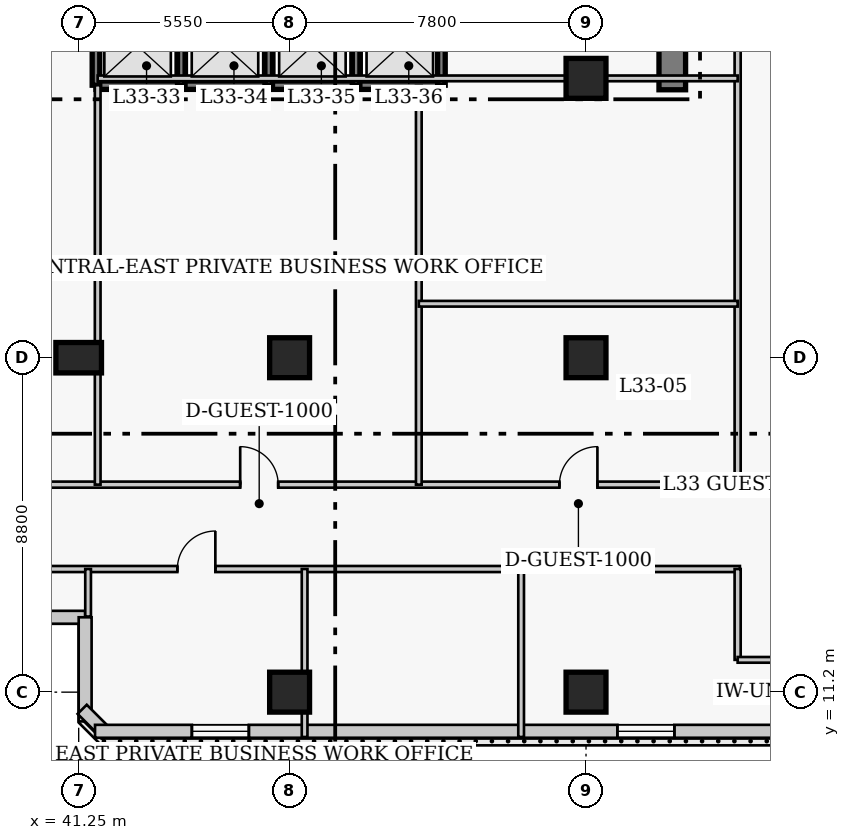
"""IFC4 building model, lengths in metres.
Left out: names, types, materials, properties, quantities, classifications, styles, units other than length and angle.
Written with IfcOpenShell. Run it as: python <this file> out.ifc"""

import sys

from ifc_helpers import new_model, si_unit, direction, frame, frame_2d, origin, origin_2d, place, context, subcontext, project, spatial, rectangle, extrude, element, fill, save


model = new_model("IFC4")
c1 = context("Model", 3, precision=1e-05, world=origin(), true_north=direction((0.0, 1.0)))
c2 = subcontext(c1, "Body", "Model", "MODEL_VIEW")
j1 = project(units=[si_unit("LENGTHUNIT", "METRE"), si_unit("PLANEANGLEUNIT", "RADIAN")], contexts=[c1])
p1 = place(None, origin())
s1 = spatial("IfcSite", under=j1, at=p1, CompositionType="ELEMENT")
p2 = place(p1, origin())
s2 = spatial("IfcBuilding", under=s1, at=p2, CompositionType="ELEMENT")
p3 = place(p2, frame((0.0, 0.0, 134.6)))
s3 = spatial("IfcBuildingStorey", under=s2, at=p3, CompositionType="ELEMENT", Elevation=134.6)
p4 = place(p3, frame((56.87, 27.05, 0.0), z_axis=(0.0, 0.0, 1.0), x_axis=(0.0, 1.0, 0.0)))
e1 = element("IfcWall", 1, at=p4, inside=s3, PredefinedType="SHEAR", context=c2, shape_type="SweptSolid", body=[
    extrude(rectangle(XDim=13.62, YDim=0.7, at=frame_2d((6.81, 0.0))), origin(), (0.0, 0.0, 1.0), 3.8),
])
p5 = place(p3, frame((41.25, 20.0, 0.0), z_axis=(0.0, 0.0, 1.0), x_axis=(1.0, 0.0, 0.0)))
e2 = element("IfcColumn", 2, at=p5, inside=s3, PredefinedType="COLUMN", context=c2, shape_type="SweptSolid", body=[
    extrude(rectangle(XDim=1.2, YDim=0.8, at=origin_2d()), origin(), (0.0, 0.0, 1.0), 3.8),
])
for number, where, z_axis, x_axis in (
    (3, (46.8, 11.2, 0.0), (0.0, 0.0, 1.0), (1.0, 0.0, 0.0)),
    (4, (46.8, 20.0, 0.0), (0.0, 0.0, 1.0), (1.0, 0.0, 0.0)),
    (5, (54.6, 11.2, 0.0), (0.0, 0.0, 1.0), (1.0, 0.0, 0.0)),
    (6, (54.6, 20.0, 0.0), (0.0, 0.0, 1.0), (1.0, 0.0, 0.0)),
    (7, (54.6, 27.35, 0.0), (0.0, 0.0, 1.0), (1.0, 0.0, 0.0)),
):
    element("IfcColumn", number, at=place(p3, frame(where, z_axis=z_axis, x_axis=x_axis)), inside=s3, PredefinedType="COLUMN", context=c2, shape_type="SweptSolid", body=[
        extrude(rectangle(XDim=1.05, YDim=1.05, at=origin_2d()), origin(), (0.0, 0.0, 1.0), 3.8),
    ])
p6 = place(p3, frame((36.58, 13.17, 0.0), z_axis=(0.0, 0.0, 1.0), x_axis=(1.0, 0.0, 0.0)))
e8 = element("IfcWall", 8, at=p6, inside=s3, PredefinedType="SOLIDWALL", context=c2, shape_type="SweptSolid", body=[
    extrude(rectangle(XDim=4.84, YDim=0.34, at=frame_2d((2.42, 0.0))), origin(), (0.0, 0.0, 1.0), 3.55),
])
p7 = place(p6, frame((1.67, 0.0, 0.85)))
e9 = element("IfcOpeningElement", 9, at=p7, cuts=e8, PredefinedType="OPENING", context=c2, shape_type="SweptSolid", body=[
    extrude(rectangle(XDim=1.5, YDim=1.75, at=frame_2d((0.75, 0.875))), frame((0.0, 0.18, 0.0), z_axis=(0.0, -1.0, 0.0), x_axis=(1.0, 0.0, 0.0)), (0.0, 0.0, 1.0), 0.36),
])
p8 = place(p3, frame((41.42, 13.17, 0.0), z_axis=(0.0, 0.0, 1.0), x_axis=(0.0, -1.0, 0.0)))
e10 = element("IfcWall", 10, at=p8, inside=s3, PredefinedType="SOLIDWALL", context=c2, shape_type="SweptSolid", body=[
    extrude(rectangle(XDim=2.74, YDim=0.34, at=frame_2d((1.37, 0.0))), origin(), (0.0, 0.0, 1.0), 3.55),
])
p9 = place(p3, frame((41.342, 10.749, 0.0), z_axis=(0.0, 0.0, 1.0), x_axis=(0.707106781187, -0.707106781187, 0.0)))
e11 = element("IfcWall", 11, at=p9, inside=s3, PredefinedType="SOLIDWALL", context=c2, shape_type="SweptSolid", body=[
    extrude(rectangle(XDim=0.929, YDim=0.34, at=frame_2d((0.464, 0.0))), origin(), (0.0, 0.0, 1.0), 3.55),
])
p10 = place(p3, frame((41.68, 10.17, 0.0), z_axis=(0.0, 0.0, 1.0), x_axis=(1.0, 0.0, 0.0)))
e12 = element("IfcWall", 12, at=p10, inside=s3, PredefinedType="SOLIDWALL", context=c2, shape_type="SweptSolid", body=[
    extrude(rectangle(XDim=26.69, YDim=0.34, at=frame_2d((13.345, 0.0))), origin(), (0.0, 0.0, 1.0), 3.55),
])
p11 = place(p10, frame((2.548, 0.0, 0.85)))
e13 = element("IfcOpeningElement", 13, at=p11, cuts=e12, PredefinedType="OPENING", context=c2, shape_type="SweptSolid", body=[
    extrude(rectangle(XDim=1.5, YDim=1.75, at=frame_2d((0.75, 0.875))), frame((0.0, 0.18, 0.0), z_axis=(0.0, -1.0, 0.0), x_axis=(1.0, 0.0, 0.0)), (0.0, 0.0, 1.0), 0.36),
])
p12 = place(p10, frame((13.745, 0.0, 0.85)))
e14 = element("IfcOpeningElement", 14, at=p12, cuts=e12, PredefinedType="OPENING", context=c2, shape_type="SweptSolid", body=[
    extrude(rectangle(XDim=1.5, YDim=1.75, at=frame_2d((0.75, 0.875))), frame((0.0, 0.18, 0.0), z_axis=(0.0, -1.0, 0.0), x_axis=(1.0, 0.0, 0.0)), (0.0, 0.0, 1.0), 0.36),
])
p13 = place(p10, frame((21.492, 0.0, 0.85)))
e15 = element("IfcOpeningElement", 15, at=p13, cuts=e12, PredefinedType="OPENING", context=c2, shape_type="SweptSolid", body=[
    extrude(rectangle(XDim=1.5, YDim=1.75, at=frame_2d((0.75, 0.875))), frame((0.0, 0.18, 0.0), z_axis=(0.0, -1.0, 0.0), x_axis=(1.0, 0.0, 0.0)), (0.0, 0.0, 1.0), 0.36),
])
p14 = place(p3, frame((41.705, 27.17, 0.0), z_axis=(0.0, 0.0, 1.0), x_axis=(1.0, 0.0, 0.0)))
e16 = element("IfcWall", 16, at=p14, inside=s3, PredefinedType="SHEAR", context=c2, shape_type="SweptSolid", body=[
    extrude(rectangle(XDim=2.245, YDim=0.22, at=frame_2d((1.123, 0.0))), origin(), (0.0, 0.0, 1.0), 3.8),
])
p15 = place(p3, frame((41.705, 27.17, 0.0), z_axis=(0.0, 0.0, 1.0), x_axis=(0.0, 1.0, 0.0)))
e17 = element("IfcWall", 17, at=p15, inside=s3, PredefinedType="SHEAR", context=c2, shape_type="SweptSolid", body=[
    extrude(rectangle(XDim=2.06, YDim=0.2, at=frame_2d((1.03, 0.0))), origin(), (0.0, 0.0, 1.0), 3.8),
])
p16 = place(p3, frame((43.95, 27.17, 0.0), z_axis=(0.0, 0.0, 1.0), x_axis=(1.0, 0.0, 0.0)))
e18 = element("IfcWall", 18, at=p16, inside=s3, PredefinedType="SHEAR", context=c2, shape_type="SweptSolid", body=[
    extrude(rectangle(XDim=2.3, YDim=0.22, at=frame_2d((1.15, 0.0))), origin(), (0.0, 0.0, 1.0), 3.8),
])
p17 = place(p3, frame((43.95, 27.17, 0.0), z_axis=(0.0, 0.0, 1.0), x_axis=(0.0, 1.0, 0.0)))
e19 = element("IfcWall", 19, at=p17, inside=s3, PredefinedType="SHEAR", context=c2, shape_type="SweptSolid", body=[
    extrude(rectangle(XDim=2.06, YDim=0.2, at=frame_2d((1.03, 0.0))), origin(), (0.0, 0.0, 1.0), 3.8),
])
p18 = place(p3, frame((46.25, 27.17, 0.0), z_axis=(0.0, 0.0, 1.0), x_axis=(1.0, 0.0, 0.0)))
e20 = element("IfcWall", 20, at=p18, inside=s3, PredefinedType="SHEAR", context=c2, shape_type="SweptSolid", body=[
    extrude(rectangle(XDim=2.3, YDim=0.22, at=frame_2d((1.15, 0.0))), origin(), (0.0, 0.0, 1.0), 3.8),
])
p19 = place(p3, frame((46.25, 27.17, 0.0), z_axis=(0.0, 0.0, 1.0), x_axis=(0.0, 1.0, 0.0)))
e21 = element("IfcWall", 21, at=p19, inside=s3, PredefinedType="SHEAR", context=c2, shape_type="SweptSolid", body=[
    extrude(rectangle(XDim=2.06, YDim=0.2, at=frame_2d((1.03, 0.0))), origin(), (0.0, 0.0, 1.0), 3.8),
])
p20 = place(p3, frame((48.55, 27.17, 0.0), z_axis=(0.0, 0.0, 1.0), x_axis=(1.0, 0.0, 0.0)))
e22 = element("IfcWall", 22, at=p20, inside=s3, PredefinedType="SHEAR", context=c2, shape_type="SweptSolid", body=[
    extrude(rectangle(XDim=2.245, YDim=0.22, at=frame_2d((1.123, 0.0))), origin(), (0.0, 0.0, 1.0), 3.8),
])
for number, where, z_axis, x_axis in (
    (23, (48.55, 27.17, 0.0), (0.0, 0.0, 1.0), (0.0, 1.0, 0.0)),
    (24, (50.795, 27.17, 0.0), (0.0, 0.0, 1.0), (0.0, 1.0, 0.0)),
):
    element("IfcWall", number, at=place(p3, frame(where, z_axis=z_axis, x_axis=x_axis)), inside=s3, PredefinedType="SHEAR", context=c2, shape_type="SweptSolid", body=[
        extrude(rectangle(XDim=2.06, YDim=0.2, at=frame_2d((1.03, 0.0))), origin(), (0.0, 0.0, 1.0), 3.8),
    ])
p21 = place(p3, frame((35.85, 16.66, 0.0), z_axis=(0.0, 0.0, 1.0), x_axis=(1.0, 0.0, 0.0)))
e25 = element("IfcWall", 25, at=p21, inside=s3, PredefinedType="PARTITIONING", context=c2, shape_type="SweptSolid", body=[
    extrude(rectangle(XDim=22.8, YDim=0.16, at=frame_2d((11.4, 0.0))), origin(), (0.0, 0.0, 1.0), 3.55),
])
p22 = place(p21, frame((9.65, 0.0, 0.0)))
e26 = element("IfcOpeningElement", 26, at=p22, cuts=e25, PredefinedType="OPENING", context=c2, shape_type="SweptSolid", body=[
    extrude(rectangle(XDim=1.0, YDim=2.15, at=frame_2d((0.5, 1.075))), frame((0.0, 0.09, 0.0), z_axis=(0.0, -1.0, 0.0), x_axis=(1.0, 0.0, 0.0)), (0.0, 0.0, 1.0), 0.18),
])
p23 = place(p21, frame((18.05, 0.0, 0.0)))
e27 = element("IfcOpeningElement", 27, at=p23, cuts=e25, PredefinedType="OPENING", context=c2, shape_type="SweptSolid", body=[
    extrude(rectangle(XDim=1.0, YDim=2.15, at=frame_2d((0.5, 1.075))), frame((0.0, 0.09, 0.0), z_axis=(0.0, -1.0, 0.0), x_axis=(1.0, 0.0, 0.0)), (0.0, 0.0, 1.0), 0.18),
])
p24 = place(p3, frame((35.8, 14.44, 0.0), z_axis=(0.0, 0.0, 1.0), x_axis=(1.0, 0.0, 0.0)))
e28 = element("IfcWall", 28, at=p24, inside=s3, PredefinedType="PARTITIONING", context=c2, shape_type="SweptSolid", body=[
    extrude(rectangle(XDim=22.85, YDim=0.16, at=frame_2d((11.425, 0.0))), origin(), (0.0, 0.0, 1.0), 3.55),
])
p25 = place(p24, frame((8.046, 0.0, 0.0)))
e29 = element("IfcOpeningElement", 29, at=p25, cuts=e28, PredefinedType="OPENING", context=c2, shape_type="SweptSolid", body=[
    extrude(rectangle(XDim=1.0, YDim=2.15, at=frame_2d((0.5, 1.075))), frame((0.0, 0.09, 0.0), z_axis=(0.0, -1.0, 0.0), x_axis=(1.0, 0.0, 0.0)), (0.0, 0.0, 1.0), 0.18),
])
p26 = place(p3, frame((58.59, 16.66, 0.0), z_axis=(0.0, 0.0, 1.0), x_axis=(0.0, 1.0, 0.0)))
e30 = element("IfcWall", 30, at=p26, inside=s3, PredefinedType="PARTITIONING", context=c2, shape_type="SweptSolid", body=[
    extrude(rectangle(XDim=23.99, YDim=0.16, at=frame_2d((11.995, 0.0))), origin(), (0.0, 0.0, 1.0), 3.093),
])
p27 = place(p3, frame((58.59, 12.05, 0.0), z_axis=(0.0, 0.0, 1.0), x_axis=(0.0, 1.0, 0.0)))
e31 = element("IfcWall", 31, at=p27, inside=s3, PredefinedType="PARTITIONING", context=c2, shape_type="SweptSolid", body=[
    extrude(rectangle(XDim=2.39, YDim=0.16, at=frame_2d((1.195, 0.0))), origin(), (0.0, 0.0, 1.0), 3.093),
])
p28 = place(p3, frame((58.59, 12.05, 0.0), z_axis=(0.0, 0.0, 1.0), x_axis=(1.0, 0.0, 0.0)))
e32 = element("IfcWall", 32, at=p28, inside=s3, PredefinedType="PARTITIONING", context=c2, shape_type="SweptSolid", body=[
    extrude(rectangle(XDim=2.22, YDim=0.15, at=frame_2d((1.11, 0.0))), origin(), (0.0, 0.0, 1.0), 3.55),
])
p29 = place(p3, frame((41.75, 16.66, 0.0), z_axis=(0.0, 0.0, 1.0), x_axis=(0.0, 1.0, 0.0)))
e33 = element("IfcWall", 33, at=p29, inside=s3, PredefinedType="PARTITIONING", context=c2, shape_type="SweptSolid", body=[
    extrude(rectangle(XDim=10.51, YDim=0.15, at=frame_2d((5.255, 0.0))), origin(), (0.0, 0.0, 1.0), 3.55),
])
p30 = place(p3, frame((50.2, 16.66, 0.0), z_axis=(0.0, 0.0, 1.0), x_axis=(0.0, 1.0, 0.0)))
e34 = element("IfcWall", 34, at=p30, inside=s3, PredefinedType="PARTITIONING", context=c2, shape_type="SweptSolid", body=[
    extrude(rectangle(XDim=10.49, YDim=0.15, at=frame_2d((5.245, 0.0))), origin(), (0.0, 0.0, 1.0), 3.55),
])
p31 = place(p3, frame((41.75, 27.35, 0.0), z_axis=(0.0, 0.0, 1.0), x_axis=(1.0, 0.0, 0.0)))
e35 = element("IfcWall", 35, at=p31, inside=s3, PredefinedType="PARTITIONING", context=c2, shape_type="SweptSolid", body=[
    extrude(rectangle(XDim=16.84, YDim=0.15, at=frame_2d((8.42, 0.0))), origin(), (0.0, 0.0, 1.0), 3.55),
])
p32 = place(p3, frame((50.2, 21.42, 0.0), z_axis=(0.0, 0.0, 1.0), x_axis=(1.0, 0.0, 0.0)))
e36 = element("IfcWall", 36, at=p32, inside=s3, PredefinedType="PARTITIONING", context=c2, shape_type="SweptSolid", body=[
    extrude(rectangle(XDim=8.39, YDim=0.15, at=frame_2d((4.195, 0.0))), origin(), (0.0, 0.0, 1.0), 3.55),
])
p33 = place(p3, frame((41.498, 13.19, 0.0), z_axis=(0.0, 0.0, 1.0), x_axis=(0.0, 1.0, 0.0)))
e37 = element("IfcWall", 37, at=p33, inside=s3, PredefinedType="PARTITIONING", context=c2, shape_type="SweptSolid", body=[
    extrude(rectangle(XDim=1.25, YDim=0.15, at=frame_2d((0.625, 0.0))), origin(), (0.0, 0.0, 1.0), 3.55),
])
for number, where, z_axis, x_axis in (
    (38, (47.195, 10.02, 0.0), (0.0, 0.0, 1.0), (0.0, 1.0, 0.0)),
    (39, (52.893, 10.02, 0.0), (0.0, 0.0, 1.0), (0.0, 1.0, 0.0)),
):
    element("IfcWall", number, at=place(p3, frame(where, z_axis=z_axis, x_axis=x_axis)), inside=s3, PredefinedType="PARTITIONING", context=c2, shape_type="SweptSolid", body=[
        extrude(rectangle(XDim=4.42, YDim=0.15, at=frame_2d((2.21, 0.0))), origin(), (0.0, 0.0, 1.0), 3.55),
    ])
p34 = place(p11, origin())
e40 = element("IfcWindow", 40, at=p34, inside=s3, PartitioningType="SINGLE_PANEL", PredefinedType="WINDOW", context=c2, shape_type="SweptSolid", body=[
    extrude(rectangle(XDim=1.5, YDim=1.75, at=frame_2d((0.75, 0.875))), frame((0.0, 0.03, 0.0), z_axis=(0.0, -1.0, 0.0), x_axis=(1.0, 0.0, 0.0)), (0.0, 0.0, 1.0), 0.06),
])
fill(e13, e40)
p35 = place(p12, origin())
e41 = element("IfcWindow", 41, at=p35, inside=s3, PartitioningType="SINGLE_PANEL", PredefinedType="WINDOW", context=c2, shape_type="SweptSolid", body=[
    extrude(rectangle(XDim=1.5, YDim=1.75, at=frame_2d((0.75, 0.875))), frame((0.0, 0.03, 0.0), z_axis=(0.0, -1.0, 0.0), x_axis=(1.0, 0.0, 0.0)), (0.0, 0.0, 1.0), 0.06),
])
fill(e14, e41)
p36 = place(p22, origin())
e42 = element("IfcDoor", 42, at=p36, inside=s3, OperationType="SINGLE_SWING_LEFT", PredefinedType="DOOR", context=c2, shape_type="SweptSolid", body=[
    extrude(rectangle(XDim=1.0, YDim=2.15, at=frame_2d((0.5, 1.075))), frame((0.0, 0.025, 0.0), z_axis=(0.0, -1.0, 0.0), x_axis=(1.0, 0.0, 0.0)), (0.0, 0.0, 1.0), 0.05),
])
fill(e26, e42)
p37 = place(p23, origin())
e43 = element("IfcDoor", 43, at=p37, inside=s3, OperationType="SINGLE_SWING_RIGHT", PredefinedType="DOOR", context=c2, shape_type="SweptSolid", body=[
    extrude(rectangle(XDim=1.0, YDim=2.15, at=frame_2d((0.5, 1.075))), frame((0.0, 0.025, 0.0), z_axis=(0.0, -1.0, 0.0), x_axis=(1.0, 0.0, 0.0)), (0.0, 0.0, 1.0), 0.05),
])
fill(e27, e43)
p38 = place(p25, origin())
e44 = element("IfcDoor", 44, at=p38, inside=s3, OperationType="SINGLE_SWING_RIGHT", PredefinedType="DOOR", context=c2, shape_type="SweptSolid", body=[
    extrude(rectangle(XDim=1.0, YDim=2.15, at=frame_2d((0.5, 1.075))), frame((0.0, 0.025, 0.0), z_axis=(0.0, -1.0, 0.0), x_axis=(1.0, 0.0, 0.0)), (0.0, 0.0, 1.0), 0.05),
])
fill(e29, e44)
save(model, sys.argv[1])
